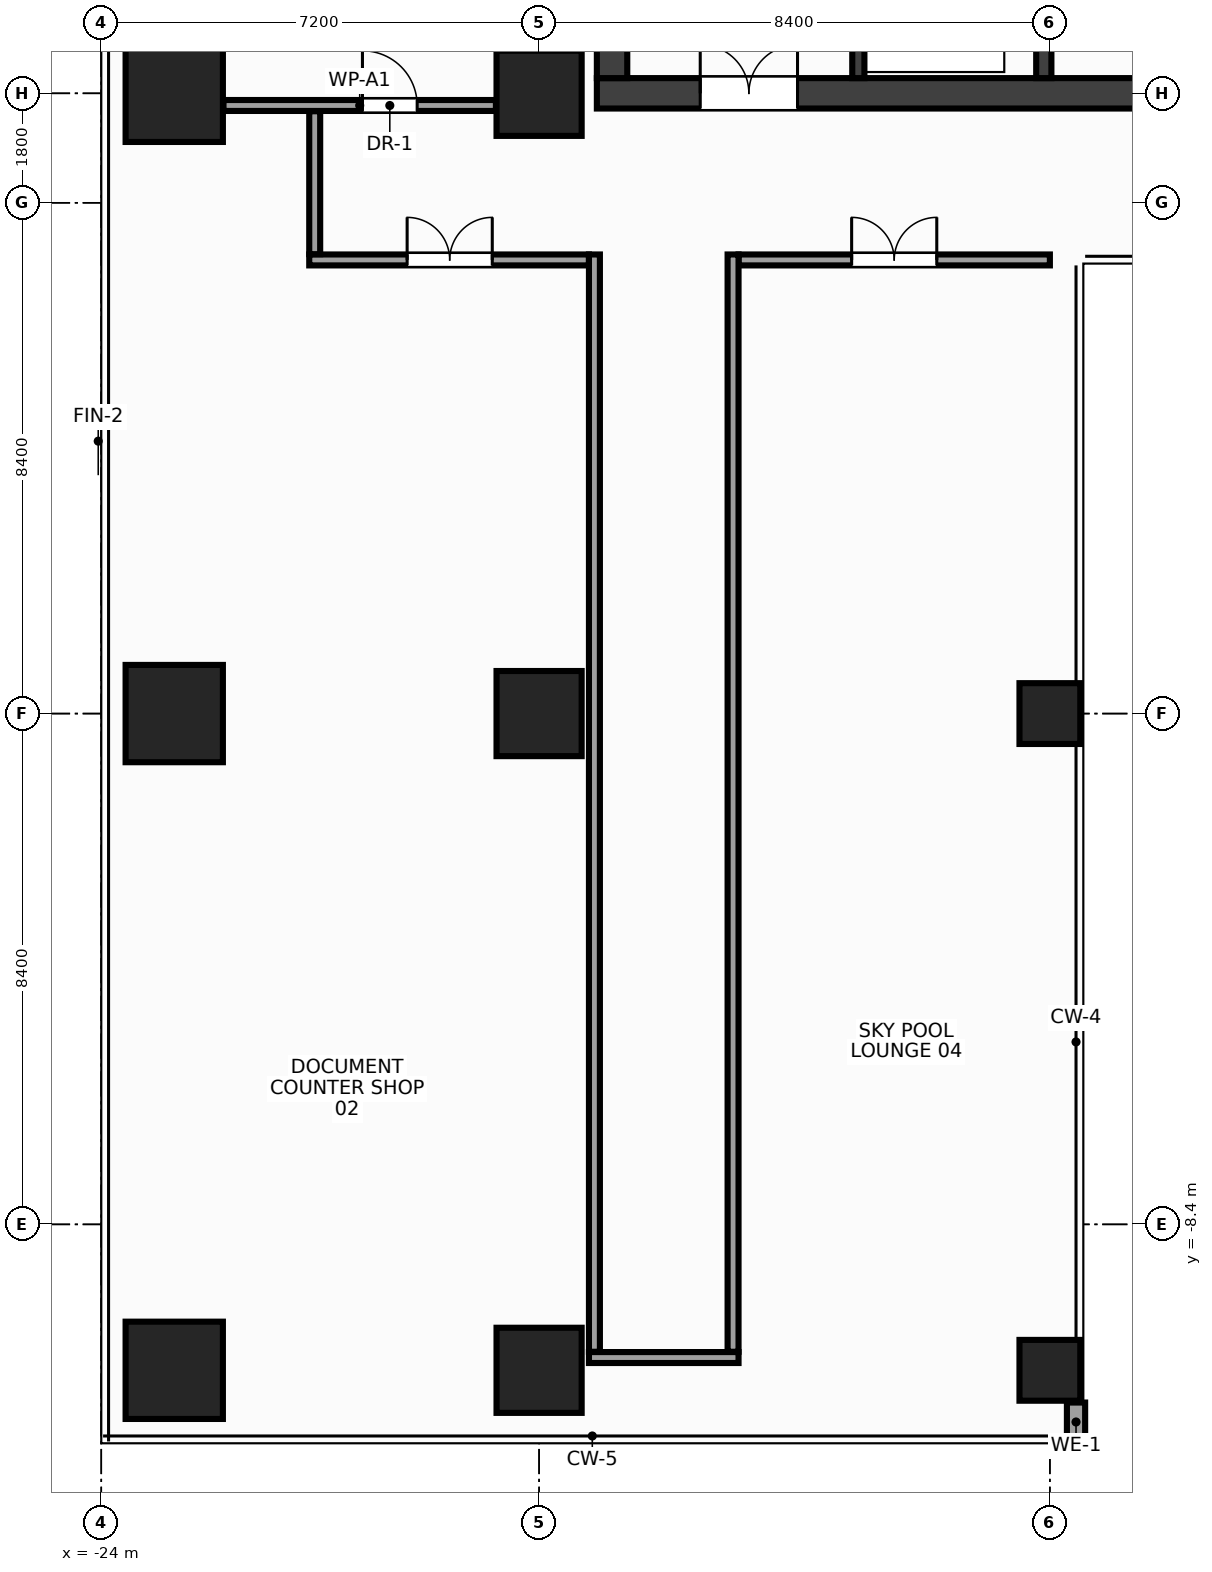
"""IFC4 building model, lengths in metres.
Left out: names, types, materials, properties, quantities, classifications, styles, units other than length and angle.
Written with IfcOpenShell. Run it as: python <this file> out.ifc"""

import sys

from ifc_helpers import new_model, si_unit, direction, frame, frame_2d, origin, origin_2d, place, context, subcontext, project, spatial, rectangle, hollow_rectangle, extrude, source, transform, mapped, element, fill, save


model = new_model("IFC4")
c1 = context("Model", 3, precision=1e-05, world=origin(), true_north=direction((0.0, 1.0)))
c2 = subcontext(c1, "Body", "Model", "MODEL_VIEW")
j1 = project(units=[si_unit("LENGTHUNIT", "METRE"), si_unit("PLANEANGLEUNIT", "RADIAN")], contexts=[c1])
p1 = place(None, origin())
s1 = spatial("IfcSite", under=j1, at=p1, CompositionType="ELEMENT")
p2 = place(p1, origin())
s2 = spatial("IfcBuilding", under=s1, at=p2, CompositionType="ELEMENT")
p3 = place(p2, frame((0.0, 0.0, 225.2)))
s3 = spatial("IfcBuildingStorey", under=s2, at=p3, CompositionType="ELEMENT", Elevation=225.2)
m1 = source(origin(), c2, "Body", "SweptSolid", [
    extrude(rectangle(XDim=31.7, YDim=0.5, at=frame_2d((15.85, 0.0))), origin(), (0.0, 0.0, 1.0), 3.6),
])
p4 = place(p3, frame((-15.85, 10.2, 0.0), z_axis=(0.0, 0.0, 1.0), x_axis=(1.0, 0.0, 0.0)))
e1 = element("IfcWall", 1, at=p4, inside=s3, PredefinedType="SHEAR", context=c2, shape_type="MappedRepresentation", body=[
    mapped(m1, transform((0.0, 0.0, 0.0), x_axis=(1.0, 0.0, 0.0), y_axis=(0.0, 1.0, 0.0), z_axis=(0.0, 0.0, 1.0), scale=1.0)),
])
p5 = place(p4, frame((1.7, 0.0, 0.0)))
e2 = element("IfcOpeningElement", 2, at=p5, cuts=e1, PredefinedType="OPENING", context=c2, shape_type="SweptSolid", body=[
    extrude(rectangle(XDim=1.6, YDim=2.15, at=frame_2d((0.8, 1.075))), frame((0.0, 0.262, 0.0), z_axis=(0.0, -1.0, 0.0), x_axis=(1.0, 0.0, 0.0)), (0.0, 0.0, 1.0), 0.524),
])
p6 = place(p4, frame((28.4, 0.0, 0.0)))
e3 = element("IfcOpeningElement", 3, at=p6, cuts=e1, PredefinedType="OPENING", context=c2, shape_type="SweptSolid", body=[
    extrude(rectangle(XDim=1.6, YDim=2.15, at=frame_2d((0.8, 1.075))), frame((0.0, 0.262, 0.0), z_axis=(0.0, -1.0, 0.0), x_axis=(1.0, 0.0, 0.0)), (0.0, 0.0, 1.0), 0.524),
])
p7 = place(p4, frame((15.1, 0.0, 0.0)))
e4 = element("IfcOpeningElement", 4, at=p7, cuts=e1, PredefinedType="OPENING", context=c2, shape_type="SweptSolid", body=[
    extrude(rectangle(XDim=1.5, YDim=2.2, at=frame_2d((0.75, 1.1))), frame((0.0, 0.262, 0.0), z_axis=(0.0, -1.0, 0.0), x_axis=(1.0, 0.0, 0.0)), (0.0, 0.0, 1.0), 0.524),
])
m2 = source(origin(), c2, "Body", "SweptSolid", [
    extrude(rectangle(XDim=13.1, YDim=0.5, at=frame_2d((6.55, 0.0))), origin(), (0.0, 0.0, 1.0), 3.6),
])
p8 = place(p3, frame((-15.6, 10.45, 0.0), z_axis=(0.0, 0.0, 1.0), x_axis=(0.0, 1.0, 0.0)))
e5 = element("IfcWall", 5, at=p8, inside=s3, PredefinedType="SHEAR", context=c2, shape_type="MappedRepresentation", body=[
    mapped(m2, transform((0.0, 0.0, 0.0), x_axis=(1.0, 0.0, 0.0), y_axis=(0.0, 1.0, 0.0), z_axis=(0.0, 0.0, 1.0), scale=1.0)),
])
m3 = source(origin(), c2, "Body", "SweptSolid", [
    extrude(rectangle(XDim=13.1, YDim=0.25, at=frame_2d((6.55, 0.0))), origin(), (0.0, 0.0, 1.0), 3.6),
])
p9 = place(p3, frame((-8.5, 10.45, 0.0), z_axis=(0.0, 0.0, 1.0), x_axis=(0.0, 1.0, 0.0)))
e6 = element("IfcWall", 6, at=p9, inside=s3, PredefinedType="SHEAR", context=c2, shape_type="MappedRepresentation", body=[
    mapped(m3, transform((0.0, 0.0, 0.0), x_axis=(1.0, 0.0, 0.0), y_axis=(0.0, 1.0, 0.0), z_axis=(0.0, 0.0, 1.0), scale=1.0)),
])
p10 = place(p9, frame((4.22, 0.0, 0.0)))
e7 = element("IfcOpeningElement", 7, at=p10, cuts=e6, PredefinedType="OPENING", context=c2, shape_type="SweptSolid", body=[
    extrude(rectangle(XDim=1.1, YDim=2.15, at=frame_2d((0.55, 1.075))), frame((0.0, 0.137, 0.0), z_axis=(0.0, -1.0, 0.0), x_axis=(1.0, 0.0, 0.0)), (0.0, 0.0, 1.0), 0.274),
])
p11 = place(p9, frame((6.14, 0.0, 0.0)))
e8 = element("IfcOpeningElement", 8, at=p11, cuts=e6, PredefinedType="OPENING", context=c2, shape_type="SweptSolid", body=[
    extrude(rectangle(XDim=1.1, YDim=2.15, at=frame_2d((0.55, 1.075))), frame((0.0, 0.137, 0.0), z_axis=(0.0, -1.0, 0.0), x_axis=(1.0, 0.0, 0.0)), (0.0, 0.0, 1.0), 0.274),
])
p12 = place(p9, frame((8.06, 0.0, 0.0)))
e9 = element("IfcOpeningElement", 9, at=p12, cuts=e6, PredefinedType="OPENING", context=c2, shape_type="SweptSolid", body=[
    extrude(rectangle(XDim=1.1, YDim=2.15, at=frame_2d((0.55, 1.075))), frame((0.0, 0.137, 0.0), z_axis=(0.0, -1.0, 0.0), x_axis=(1.0, 0.0, 0.0)), (0.0, 0.0, 1.0), 0.274),
])
m4 = source(origin(), c2, "Body", "SweptSolid", [
    extrude(rectangle(XDim=3.2, YDim=0.2, at=frame_2d((1.6, 0.0))), origin(), (0.0, 0.0, 1.0), 3.6),
])
p13 = place(p3, frame((-11.55, 10.45, 0.0), z_axis=(0.0, 0.0, 1.0), x_axis=(0.0, 1.0, 0.0)))
e10 = element("IfcWall", 10, at=p13, inside=s3, PredefinedType="SHEAR", context=c2, shape_type="MappedRepresentation", body=[
    mapped(m4, transform((0.0, 0.0, 0.0), x_axis=(1.0, 0.0, 0.0), y_axis=(0.0, 1.0, 0.0), z_axis=(0.0, 0.0, 1.0), scale=1.0)),
])
p14 = place(p13, frame((0.9, 0.0, 0.0)))
e11 = element("IfcOpeningElement", 11, at=p14, cuts=e10, PredefinedType="OPENING", context=c2, shape_type="SweptSolid", body=[
    extrude(rectangle(XDim=1.1, YDim=2.15, at=frame_2d((0.55, 1.075))), frame((0.0, 0.112, 0.0), z_axis=(0.0, -1.0, 0.0), x_axis=(1.0, 0.0, 0.0)), (0.0, 0.0, 1.0), 0.224),
])
m5 = source(origin(), c2, "Body", "SweptSolid", [
    extrude(rectangle(XDim=1.4, YDim=1.4, at=origin_2d()), origin(), (0.0, 0.0, 1.0), 3.6),
])
for number, where, z_axis, x_axis in (
    (12, (-16.8, -10.8, 0.0), (0.0, 0.0, 1.0), (1.0, 0.0, 0.0)),
    (13, (-16.8, 0.0, 0.0), (0.0, 0.0, 1.0), (1.0, 0.0, 0.0)),
    (14, (-16.8, 10.2, 0.0), (0.0, 0.0, 1.0), (1.0, 0.0, 0.0)),
):
    element("IfcColumn", number, at=place(p3, frame(where, z_axis=z_axis, x_axis=x_axis)), inside=s3, PredefinedType="COLUMN", context=c2, shape_type="MappedRepresentation", body=[
        mapped(m5, transform((0.0, 0.0, 0.0), x_axis=(1.0, 0.0, 0.0), y_axis=(0.0, 1.0, 0.0), z_axis=(0.0, 0.0, 1.0), scale=1.0)),
    ])
m6 = source(origin(), c2, "Body", "SweptSolid", [
    extrude(rectangle(XDim=1.6, YDim=1.6, at=origin_2d()), origin(), (0.0, 0.0, 1.0), 3.6),
])
for number, where, z_axis, x_axis in (
    (15, (-22.8, -10.8, 0.0), (0.0, 0.0, 1.0), (1.0, 0.0, 0.0)),
    (16, (-22.8, 0.0, 0.0), (0.0, 0.0, 1.0), (1.0, 0.0, 0.0)),
    (17, (-22.8, 10.2, 0.0), (0.0, 0.0, 1.0), (1.0, 0.0, 0.0)),
):
    element("IfcColumn", number, at=place(p3, frame(where, z_axis=z_axis, x_axis=x_axis)), inside=s3, PredefinedType="COLUMN", context=c2, shape_type="MappedRepresentation", body=[
        mapped(m6, transform((0.0, 0.0, 0.0), x_axis=(1.0, 0.0, 0.0), y_axis=(0.0, 1.0, 0.0), z_axis=(0.0, 0.0, 1.0), scale=1.0)),
    ])
m7 = source(origin(), c2, "Body", "SweptSolid", [
    extrude(hollow_rectangle(XDim=1.0, YDim=1.0, WallThickness=0.045, at=origin_2d()), origin(), (0.0, 0.0, 1.0), 3.6),
])
for number, where, z_axis, x_axis in (
    (18, (-8.4, 0.0, 0.0), (0.0, 0.0, 1.0), (1.0, 0.0, 0.0)),
    (19, (-8.4, -10.8, 0.0), (0.0, 0.0, 1.0), (1.0, 0.0, 0.0)),
):
    element("IfcColumn", number, at=place(p3, frame(where, z_axis=z_axis, x_axis=x_axis)), inside=s3, PredefinedType="COLUMN", context=c2, shape_type="MappedRepresentation", body=[
        mapped(m7, transform((0.0, 0.0, 0.0), x_axis=(1.0, 0.0, 0.0), y_axis=(0.0, 1.0, 0.0), z_axis=(0.0, 0.0, 1.0), scale=1.0)),
    ])
m8 = source(origin(), c2, "Body", "SweptSolid", [
    extrude(rectangle(XDim=0.64, YDim=0.24, at=frame_2d((0.32, 0.0))), origin(), (0.0, 0.0, 1.0), 2.66),
])
p15 = place(p3, frame((-7.97, -11.97, 0.0), z_axis=(0.0, 0.0, 1.0), x_axis=(0.0, 1.0, 0.0)))
e20 = element("IfcWall", 20, at=p15, inside=s3, PredefinedType="STANDARD", context=c2, shape_type="MappedRepresentation", body=[
    mapped(m8, transform((0.0, 0.0, 0.0), x_axis=(1.0, 0.0, 0.0), y_axis=(0.0, 1.0, 0.0), z_axis=(0.0, 0.0, 1.0), scale=1.0)),
])
m9 = source(origin(), c2, "Body", "SweptSolid", [
    extrude(rectangle(XDim=4.48, YDim=0.18, at=frame_2d((2.24, 0.0))), origin(), (0.0, 0.0, 1.0), 2.815),
])
p16 = place(p3, frame((-21.99, 10.0, 0.0), z_axis=(0.0, 0.0, 1.0), x_axis=(1.0, 0.0, 0.0)))
e21 = element("IfcWall", 21, at=p16, inside=s3, PredefinedType="PARTITIONING", context=c2, shape_type="MappedRepresentation", body=[
    mapped(m9, transform((0.0, 0.0, 0.0), x_axis=(1.0, 0.0, 0.0), y_axis=(0.0, 1.0, 0.0), z_axis=(0.0, 0.0, 1.0), scale=1.0)),
])
p17 = place(p16, frame((2.285, 0.0, 0.0)))
e22 = element("IfcOpeningElement", 22, at=p17, cuts=e21, PredefinedType="OPENING", context=c2, shape_type="SweptSolid", body=[
    extrude(rectangle(XDim=0.9, YDim=2.15, at=frame_2d((0.45, 1.075))), frame((0.0, 0.102, 0.0), z_axis=(0.0, -1.0, 0.0), x_axis=(1.0, 0.0, 0.0)), (0.0, 0.0, 1.0), 0.204),
])
m10 = source(origin(), c2, "Body", "SweptSolid", [
    extrude(rectangle(XDim=4.6, YDim=0.18, at=frame_2d((2.3, 0.0))), origin(), (0.0, 0.0, 1.0), 2.665),
])
p18 = place(p3, frame((-20.58, 7.46, 0.0), z_axis=(0.0, 0.0, 1.0), x_axis=(1.0, 0.0, 0.0)))
e23 = element("IfcWall", 23, at=p18, inside=s3, PredefinedType="PARTITIONING", context=c2, shape_type="MappedRepresentation", body=[
    mapped(m10, transform((0.0, 0.0, 0.0), x_axis=(1.0, 0.0, 0.0), y_axis=(0.0, 1.0, 0.0), z_axis=(0.0, 0.0, 1.0), scale=1.0)),
])
p19 = place(p18, frame((1.61, 0.0, 0.0)))
e24 = element("IfcOpeningElement", 24, at=p19, cuts=e23, PredefinedType="OPENING", context=c2, shape_type="SweptSolid", body=[
    extrude(rectangle(XDim=1.4, YDim=2.2, at=frame_2d((0.7, 1.1))), frame((0.0, 0.102, 0.0), z_axis=(0.0, -1.0, 0.0), x_axis=(1.0, 0.0, 0.0)), (0.0, 0.0, 1.0), 0.204),
])
m11 = source(origin(), c2, "Body", "SweptSolid", [
    extrude(rectangle(XDim=5.12, YDim=0.18, at=frame_2d((2.56, 0.0))), origin(), (0.0, 0.0, 1.0), 3.28),
])
p20 = place(p3, frame((-13.52, 7.46, 0.0), z_axis=(0.0, 0.0, 1.0), x_axis=(1.0, 0.0, 0.0)))
e25 = element("IfcWall", 25, at=p20, inside=s3, PredefinedType="PARTITIONING", context=c2, shape_type="MappedRepresentation", body=[
    mapped(m11, transform((0.0, 0.0, 0.0), x_axis=(1.0, 0.0, 0.0), y_axis=(0.0, 1.0, 0.0), z_axis=(0.0, 0.0, 1.0), scale=1.0)),
])
p21 = place(p20, frame((1.86, 0.0, 0.0)))
e26 = element("IfcOpeningElement", 26, at=p21, cuts=e25, PredefinedType="OPENING", context=c2, shape_type="SweptSolid", body=[
    extrude(rectangle(XDim=1.4, YDim=2.2, at=frame_2d((0.7, 1.1))), frame((0.0, 0.102, 0.0), z_axis=(0.0, -1.0, 0.0), x_axis=(1.0, 0.0, 0.0)), (0.0, 0.0, 1.0), 0.204),
])
m12 = source(origin(), c2, "Body", "SweptSolid", [
    extrude(rectangle(XDim=2.46, YDim=0.18, at=frame_2d((1.23, 0.0))), origin(), (0.0, 0.0, 1.0), 2.815),
])
p22 = place(p3, frame((-15.98, -10.59, 0.0), z_axis=(0.0, 0.0, 1.0), x_axis=(1.0, 0.0, 0.0)))
e27 = element("IfcWall", 27, at=p22, inside=s3, PredefinedType="PARTITIONING", context=c2, shape_type="MappedRepresentation", body=[
    mapped(m12, transform((0.0, 0.0, 0.0), x_axis=(1.0, 0.0, 0.0), y_axis=(0.0, 1.0, 0.0), z_axis=(0.0, 0.0, 1.0), scale=1.0)),
])
m13 = source(origin(), c2, "Body", "SweptSolid", [
    extrude(rectangle(XDim=2.35, YDim=0.18, at=frame_2d((1.175, 0.0))), origin(), (0.0, 0.0, 1.0), 3.28),
])
p23 = place(p3, frame((-20.49, 7.555, 0.0), z_axis=(0.0, 0.0, 1.0), x_axis=(0.0, 1.0, 0.0)))
e28 = element("IfcWall", 28, at=p23, inside=s3, PredefinedType="PARTITIONING", context=c2, shape_type="MappedRepresentation", body=[
    mapped(m13, transform((0.0, 0.0, 0.0), x_axis=(1.0, 0.0, 0.0), y_axis=(0.0, 1.0, 0.0), z_axis=(0.0, 0.0, 1.0), scale=1.0)),
])
m14 = source(origin(), c2, "Body", "SweptSolid", [
    extrude(rectangle(XDim=18.045, YDim=0.18, at=frame_2d((9.022, 0.0))), origin(), (0.0, 0.0, 1.0), 2.815),
])
for number, where, z_axis, x_axis in (
    (29, (-15.89, -10.495, 0.0), (0.0, 0.0, 1.0), (0.0, 1.0, 0.0)),
    (30, (-13.61, -10.495, 0.0), (0.0, 0.0, 1.0), (0.0, 1.0, 0.0)),
):
    element("IfcWall", number, at=place(p3, frame(where, z_axis=z_axis, x_axis=x_axis)), inside=s3, PredefinedType="PARTITIONING", context=c2, shape_type="MappedRepresentation", body=[
        mapped(m14, transform((0.0, 0.0, 0.0), x_axis=(1.0, 0.0, 0.0), y_axis=(0.0, 1.0, 0.0), z_axis=(0.0, 0.0, 1.0), scale=1.0)),
    ])
m15 = source(origin(), c2, "Body", "SweptSolid", [
    extrude(rectangle(XDim=1.6, YDim=2.15, at=frame_2d((0.8, 1.075))), frame((0.0, 0.025, 0.0), z_axis=(0.0, -1.0, 0.0), x_axis=(1.0, 0.0, 0.0)), (0.0, 0.0, 1.0), 0.05),
])
p24 = place(p5, origin())
e31 = element("IfcDoor", 31, at=p24, inside=s3, OperationType="DOUBLE_DOOR_SINGLE_SWING", PredefinedType="DOOR", context=c2, shape_type="MappedRepresentation", body=[
    mapped(m15, transform((0.0, 0.0, 0.0), x_axis=(1.0, 0.0, 0.0), y_axis=(0.0, 1.0, 0.0), z_axis=(0.0, 0.0, 1.0), scale=1.0)),
])
fill(e2, e31)
m16 = source(origin(), c2, "Body", "SweptSolid", [
    extrude(rectangle(XDim=0.9, YDim=2.15, at=frame_2d((0.45, 1.075))), frame((0.0, 0.025, 0.0), z_axis=(0.0, -1.0, 0.0), x_axis=(1.0, 0.0, 0.0)), (0.0, 0.0, 1.0), 0.05),
])
p25 = place(p17, origin())
e32 = element("IfcDoor", 32, at=p25, inside=s3, OperationType="SINGLE_SWING_LEFT", PredefinedType="DOOR", context=c2, shape_type="MappedRepresentation", body=[
    mapped(m16, transform((0.0, 0.0, 0.0), x_axis=(1.0, 0.0, 0.0), y_axis=(0.0, 1.0, 0.0), z_axis=(0.0, 0.0, 1.0), scale=1.0)),
])
fill(e22, e32)
m17 = source(origin(), c2, "Body", "SweptSolid", [
    extrude(rectangle(XDim=1.4, YDim=2.2, at=frame_2d((0.7, 1.1))), frame((0.0, 0.025, 0.0), z_axis=(0.0, -1.0, 0.0), x_axis=(1.0, 0.0, 0.0)), (0.0, 0.0, 1.0), 0.05),
])
p26 = place(p19, origin())
e33 = element("IfcDoor", 33, at=p26, inside=s3, OperationType="DOUBLE_DOOR_SINGLE_SWING", PredefinedType="DOOR", context=c2, shape_type="MappedRepresentation", body=[
    mapped(m17, transform((0.0, 0.0, 0.0), x_axis=(1.0, 0.0, 0.0), y_axis=(0.0, 1.0, 0.0), z_axis=(0.0, 0.0, 1.0), scale=1.0)),
])
fill(e24, e33)
p27 = place(p21, origin())
e34 = element("IfcDoor", 34, at=p27, inside=s3, OperationType="DOUBLE_DOOR_SINGLE_SWING", PredefinedType="DOOR", context=c2, shape_type="MappedRepresentation", body=[
    mapped(m17, transform((0.0, 0.0, 0.0), x_axis=(1.0, 0.0, 0.0), y_axis=(0.0, 1.0, 0.0), z_axis=(0.0, 0.0, 1.0), scale=1.0)),
])
fill(e26, e34)
save(model, sys.argv[1])
